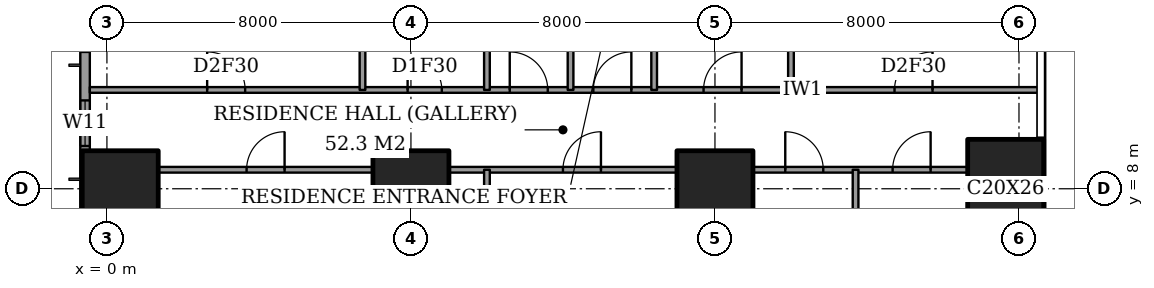
"""IFC4 building model, lengths in metres.
Left out: names, types, materials, properties, quantities, classifications, styles, units other than length and angle.
Written with IfcOpenShell. Run it as: python <this file> out.ifc"""

import sys

from ifc_helpers import new_model, si_unit, direction, frame, frame_2d, origin, origin_2d, place, context, subcontext, project, spatial, rectangle, extrude, element, fill, save


model = new_model("IFC4")
c1 = context("Model", 3, precision=1e-05, world=origin(), true_north=direction((0.0, 1.0)))
c2 = subcontext(c1, "Body", "Model", "MODEL_VIEW")
j1 = project(units=[si_unit("LENGTHUNIT", "METRE"), si_unit("PLANEANGLEUNIT", "RADIAN")], contexts=[c1])
p1 = place(None, origin())
s1 = spatial("IfcSite", under=j1, at=p1, CompositionType="ELEMENT")
p2 = place(p1, origin())
s2 = spatial("IfcBuilding", under=s1, at=p2, CompositionType="ELEMENT")
p3 = place(p2, frame((0.0, 0.0, 125.0)))
s3 = spatial("IfcBuildingStorey", under=s2, at=p3, CompositionType="ELEMENT", Elevation=125.0)
for number, where, z_axis, x_axis in (
    (1, (0.35, 8.0, 0.0), (0.0, 0.0, 1.0), (1.0, 0.0, 0.0)),
    (2, (8.0, 8.0, 0.0), (0.0, 0.0, 1.0), (1.0, 0.0, 0.0)),
    (3, (16.0, 8.0, 0.0), (0.0, 0.0, 1.0), (1.0, 0.0, 0.0)),
):
    element("IfcColumn", number, at=place(p3, frame(where, z_axis=z_axis, x_axis=x_axis)), inside=s3, PredefinedType="COLUMN", context=c2, shape_type="SweptSolid", body=[
        extrude(rectangle(XDim=2.0, YDim=2.0, at=origin_2d()), origin(), (0.0, 0.0, 1.0), 3.6),
    ])
p4 = place(p3, frame((23.65, 8.0, 0.0), z_axis=(0.0, 0.0, 1.0), x_axis=(1.0, 0.0, 0.0)))
e4 = element("IfcColumn", 4, at=p4, inside=s3, PredefinedType="COLUMN", context=c2, shape_type="SweptSolid", body=[
    extrude(rectangle(XDim=2.0, YDim=2.6, at=origin_2d()), origin(), (0.0, 0.0, 1.0), 3.6),
])
p5 = place(p3, frame((-0.575, 44.825, 0.0), z_axis=(0.0, 0.0, 1.0), x_axis=(0.0, -1.0, 0.0)))
e5 = element("IfcWall", 5, at=p5, inside=s3, PredefinedType="SOLIDWALL", context=c2, shape_type="SweptSolid", body=[
    extrude(rectangle(XDim=41.65, YDim=0.25, at=frame_2d((20.825, 0.0))), origin(), (0.0, 0.0, 1.0), 3.6),
])
p6 = place(p5, frame((0.775, 0.0, 0.4)))
e6 = element("IfcOpeningElement", 6, at=p6, cuts=e5, PredefinedType="OPENING", context=c2, shape_type="SweptSolid", body=[
    extrude(rectangle(XDim=2.4, YDim=2.2, at=frame_2d((1.2, 1.1))), frame((0.0, 0.135, 0.0), z_axis=(0.0, -1.0, 0.0), x_axis=(1.0, 0.0, 0.0)), (0.0, 0.0, 1.0), 0.27),
])
p7 = place(p5, frame((6.2, 0.0, 0.4)))
e7 = element("IfcOpeningElement", 7, at=p7, cuts=e5, PredefinedType="OPENING", context=c2, shape_type="SweptSolid", body=[
    extrude(rectangle(XDim=1.2, YDim=2.2, at=frame_2d((0.6, 1.1))), frame((0.0, 0.135, 0.0), z_axis=(0.0, -1.0, 0.0), x_axis=(1.0, 0.0, 0.0)), (0.0, 0.0, 1.0), 0.27),
])
p8 = place(p5, frame((8.525, 0.0, 0.4)))
e8 = element("IfcOpeningElement", 8, at=p8, cuts=e5, PredefinedType="OPENING", context=c2, shape_type="SweptSolid", body=[
    extrude(rectangle(XDim=2.4, YDim=2.2, at=frame_2d((1.2, 1.1))), frame((0.0, 0.135, 0.0), z_axis=(0.0, -1.0, 0.0), x_axis=(1.0, 0.0, 0.0)), (0.0, 0.0, 1.0), 0.27),
])
p9 = place(p5, frame((15.625, 0.0, 0.4)))
e9 = element("IfcOpeningElement", 9, at=p9, cuts=e5, PredefinedType="OPENING", context=c2, shape_type="SweptSolid", body=[
    extrude(rectangle(XDim=2.4, YDim=2.2, at=frame_2d((1.2, 1.1))), frame((0.0, 0.135, 0.0), z_axis=(0.0, -1.0, 0.0), x_axis=(1.0, 0.0, 0.0)), (0.0, 0.0, 1.0), 0.27),
])
p10 = place(p5, frame((23.625, 0.0, 0.4)))
e10 = element("IfcOpeningElement", 10, at=p10, cuts=e5, PredefinedType="OPENING", context=c2, shape_type="SweptSolid", body=[
    extrude(rectangle(XDim=2.4, YDim=2.2, at=frame_2d((1.2, 1.1))), frame((0.0, 0.135, 0.0), z_axis=(0.0, -1.0, 0.0), x_axis=(1.0, 0.0, 0.0)), (0.0, 0.0, 1.0), 0.27),
])
p11 = place(p5, frame((30.825, 0.0, 0.4)))
e11 = element("IfcOpeningElement", 11, at=p11, cuts=e5, PredefinedType="OPENING", context=c2, shape_type="SweptSolid", body=[
    extrude(rectangle(XDim=2.4, YDim=2.2, at=frame_2d((1.2, 1.1))), frame((0.0, 0.135, 0.0), z_axis=(0.0, -1.0, 0.0), x_axis=(1.0, 0.0, 0.0)), (0.0, 0.0, 1.0), 0.27),
])
p12 = place(p5, frame((34.5, 0.0, 0.4)))
e12 = element("IfcOpeningElement", 12, at=p12, cuts=e5, PredefinedType="OPENING", context=c2, shape_type="SweptSolid", body=[
    extrude(rectangle(XDim=1.2, YDim=2.2, at=frame_2d((0.6, 1.1))), frame((0.0, 0.135, 0.0), z_axis=(0.0, -1.0, 0.0), x_axis=(1.0, 0.0, 0.0)), (0.0, 0.0, 1.0), 0.27),
])
p13 = place(p5, frame((38.475, 0.0, 0.4)))
e13 = element("IfcOpeningElement", 13, at=p13, cuts=e5, PredefinedType="OPENING", context=c2, shape_type="SweptSolid", body=[
    extrude(rectangle(XDim=2.4, YDim=2.2, at=frame_2d((1.2, 1.1))), frame((0.0, 0.135, 0.0), z_axis=(0.0, -1.0, 0.0), x_axis=(1.0, 0.0, 0.0)), (0.0, 0.0, 1.0), 0.27),
])
p14 = place(p3, frame((1.35, 8.5, 0.0), z_axis=(0.0, 0.0, 1.0), x_axis=(1.0, 0.0, 0.0)))
e14 = element("IfcWall", 14, at=p14, inside=s3, PredefinedType="PARTITIONING", context=c2, shape_type="SweptSolid", body=[
    extrude(rectangle(XDim=5.65, YDim=0.15, at=frame_2d((2.825, 0.0))), origin(), (0.0, 0.0, 1.0), 3.35),
])
p15 = place(p14, frame((2.325, 0.0, 0.0)))
e15 = element("IfcOpeningElement", 15, at=p15, cuts=e14, PredefinedType="OPENING", context=c2, shape_type="SweptSolid", body=[
    extrude(rectangle(XDim=1.0, YDim=2.1, at=frame_2d((0.5, 1.05))), frame((0.0, 0.085, 0.0), z_axis=(0.0, -1.0, 0.0), x_axis=(1.0, 0.0, 0.0)), (0.0, 0.0, 1.0), 0.17),
])
p16 = place(p3, frame((9.0, 8.5, 0.0), z_axis=(0.0, 0.0, 1.0), x_axis=(1.0, 0.0, 0.0)))
e16 = element("IfcWall", 16, at=p16, inside=s3, PredefinedType="PARTITIONING", context=c2, shape_type="SweptSolid", body=[
    extrude(rectangle(XDim=6.0, YDim=0.15, at=frame_2d((3.0, 0.0))), origin(), (0.0, 0.0, 1.0), 3.35),
])
p17 = place(p16, frame((3.0, 0.0, 0.0)))
e17 = element("IfcOpeningElement", 17, at=p17, cuts=e16, PredefinedType="OPENING", context=c2, shape_type="SweptSolid", body=[
    extrude(rectangle(XDim=1.0, YDim=2.1, at=frame_2d((0.5, 1.05))), frame((0.0, 0.085, 0.0), z_axis=(0.0, -1.0, 0.0), x_axis=(1.0, 0.0, 0.0)), (0.0, 0.0, 1.0), 0.17),
])
p18 = place(p3, frame((17.0, 8.5, 0.0), z_axis=(0.0, 0.0, 1.0), x_axis=(1.0, 0.0, 0.0)))
e18 = element("IfcWall", 18, at=p18, inside=s3, PredefinedType="PARTITIONING", context=c2, shape_type="SweptSolid", body=[
    extrude(rectangle(XDim=5.65, YDim=0.15, at=frame_2d((2.825, 0.0))), origin(), (0.0, 0.0, 1.0), 3.35),
])
p19 = place(p18, frame((0.85, 0.0, 0.0)))
e19 = element("IfcOpeningElement", 19, at=p19, cuts=e18, PredefinedType="OPENING", context=c2, shape_type="SweptSolid", body=[
    extrude(rectangle(XDim=1.0, YDim=2.1, at=frame_2d((0.5, 1.05))), frame((0.0, 0.085, 0.0), z_axis=(0.0, -1.0, 0.0), x_axis=(1.0, 0.0, 0.0)), (0.0, 0.0, 1.0), 0.17),
])
p20 = place(p18, frame((3.675, 0.0, 0.0)))
e20 = element("IfcOpeningElement", 20, at=p20, cuts=e18, PredefinedType="OPENING", context=c2, shape_type="SweptSolid", body=[
    extrude(rectangle(XDim=1.0, YDim=2.1, at=frame_2d((0.5, 1.05))), frame((0.0, 0.085, 0.0), z_axis=(0.0, -1.0, 0.0), x_axis=(1.0, 0.0, 0.0)), (0.0, 0.0, 1.0), 0.17),
])
p21 = place(p3, frame((-0.45, 10.6, 0.0), z_axis=(0.0, 0.0, 1.0), x_axis=(1.0, 0.0, 0.0)))
e21 = element("IfcWall", 21, at=p21, inside=s3, PredefinedType="PARTITIONING", context=c2, shape_type="SweptSolid", body=[
    extrude(rectangle(XDim=25.011, YDim=0.15, at=frame_2d((12.505, 0.0))), origin(), (0.0, 0.0, 1.0), 3.35),
])
p22 = place(p21, frame((13.25, 0.0, 0.0)))
e22 = element("IfcOpeningElement", 22, at=p22, cuts=e21, PredefinedType="OPENING", context=c2, shape_type="SweptSolid", body=[
    extrude(rectangle(XDim=1.0, YDim=2.1, at=frame_2d((0.5, 1.05))), frame((0.0, 0.085, 0.0), z_axis=(0.0, -1.0, 0.0), x_axis=(1.0, 0.0, 0.0)), (0.0, 0.0, 1.0), 0.17),
])
p23 = place(p21, frame((3.087, 0.0, 0.0)))
e23 = element("IfcOpeningElement", 23, at=p23, cuts=e21, PredefinedType="OPENING", context=c2, shape_type="SweptSolid", body=[
    extrude(rectangle(XDim=1.0, YDim=2.1, at=frame_2d((0.5, 1.05))), frame((0.0, 0.085, 0.0), z_axis=(0.0, -1.0, 0.0), x_axis=(1.0, 0.0, 0.0)), (0.0, 0.0, 1.0), 0.17),
])
p24 = place(p21, frame((8.363, 0.0, 0.0)))
e24 = element("IfcOpeningElement", 24, at=p24, cuts=e21, PredefinedType="OPENING", context=c2, shape_type="SweptSolid", body=[
    extrude(rectangle(XDim=0.9, YDim=2.1, at=frame_2d((0.45, 1.05))), frame((0.0, 0.085, 0.0), z_axis=(0.0, -1.0, 0.0), x_axis=(1.0, 0.0, 0.0)), (0.0, 0.0, 1.0), 0.17),
])
p25 = place(p21, frame((11.05, 0.0, 0.0)))
e25 = element("IfcOpeningElement", 25, at=p25, cuts=e21, PredefinedType="OPENING", context=c2, shape_type="SweptSolid", body=[
    extrude(rectangle(XDim=1.0, YDim=2.1, at=frame_2d((0.5, 1.05))), frame((0.0, 0.085, 0.0), z_axis=(0.0, -1.0, 0.0), x_axis=(1.0, 0.0, 0.0)), (0.0, 0.0, 1.0), 0.17),
])
p26 = place(p21, frame((16.15, 0.0, 0.0)))
e26 = element("IfcOpeningElement", 26, at=p26, cuts=e21, PredefinedType="OPENING", context=c2, shape_type="SweptSolid", body=[
    extrude(rectangle(XDim=1.0, YDim=2.1, at=frame_2d((0.5, 1.05))), frame((0.0, 0.085, 0.0), z_axis=(0.0, -1.0, 0.0), x_axis=(1.0, 0.0, 0.0)), (0.0, 0.0, 1.0), 0.17),
])
p27 = place(p21, frame((21.175, 0.0, 0.0)))
e27 = element("IfcOpeningElement", 27, at=p27, cuts=e21, PredefinedType="OPENING", context=c2, shape_type="SweptSolid", body=[
    extrude(rectangle(XDim=1.0, YDim=2.1, at=frame_2d((0.5, 1.05))), frame((0.0, 0.085, 0.0), z_axis=(0.0, -1.0, 0.0), x_axis=(1.0, 0.0, 0.0)), (0.0, 0.0, 1.0), 0.17),
])
p28 = place(p3, frame((6.725, 10.6, 0.0), z_axis=(0.0, 0.0, 1.0), x_axis=(0.0, 1.0, 0.0)))
e28 = element("IfcWall", 28, at=p28, inside=s3, PredefinedType="PARTITIONING", context=c2, shape_type="SweptSolid", body=[
    extrude(rectangle(XDim=4.2, YDim=0.15, at=frame_2d((2.1, 0.0))), origin(), (0.0, 0.0, 1.0), 3.35),
])
p29 = place(p3, frame((10.0, -0.45, 0.0), z_axis=(0.0, 0.0, 1.0), x_axis=(0.0, 1.0, 0.0)))
e29 = element("IfcWall", 29, at=p29, inside=s3, PredefinedType="PARTITIONING", context=c2, shape_type="SweptSolid", body=[
    extrude(rectangle(XDim=8.95, YDim=0.15, at=frame_2d((4.475, 0.0))), origin(), (0.0, 0.0, 1.0), 3.35),
])
p30 = place(p3, frame((10.0, 10.6, 0.0), z_axis=(0.0, 0.0, 1.0), x_axis=(0.0, 1.0, 0.0)))
e30 = element("IfcWall", 30, at=p30, inside=s3, PredefinedType="PARTITIONING", context=c2, shape_type="SweptSolid", body=[
    extrude(rectangle(XDim=11.0, YDim=0.15, at=frame_2d((5.5, 0.0))), origin(), (0.0, 0.0, 1.0), 3.35),
])
p31 = place(p30, frame((8.2, 0.0, 0.0)))
e31 = element("IfcOpeningElement", 31, at=p31, cuts=e30, PredefinedType="OPENING", context=c2, shape_type="SweptSolid", body=[
    extrude(rectangle(XDim=1.0, YDim=2.1, at=frame_2d((0.5, 1.05))), frame((0.0, 0.085, 0.0), z_axis=(0.0, -1.0, 0.0), x_axis=(1.0, 0.0, 0.0)), (0.0, 0.0, 1.0), 0.17),
])
for number, where, z_axis, x_axis in (
    (32, (12.2, 10.6, 0.0), (0.0, 0.0, 1.0), (0.0, 1.0, 0.0)),
    (33, (14.4, 10.6, 0.0), (0.0, 0.0, 1.0), (0.0, 1.0, 0.0)),
    (34, (18.0, 10.6, 0.0), (0.0, 0.0, 1.0), (0.0, 1.0, 0.0)),
):
    element("IfcWall", number, at=place(p3, frame(where, z_axis=z_axis, x_axis=x_axis)), inside=s3, PredefinedType="PARTITIONING", context=c2, shape_type="SweptSolid", body=[
        extrude(rectangle(XDim=6.4, YDim=0.15, at=frame_2d((3.2, 0.0))), origin(), (0.0, 0.0, 1.0), 3.35),
    ])
p32 = place(p3, frame((19.7, -0.45, 0.0), z_axis=(0.0, 0.0, 1.0), x_axis=(0.0, 1.0, 0.0)))
e35 = element("IfcWall", 35, at=p32, inside=s3, PredefinedType="PARTITIONING", context=c2, shape_type="SweptSolid", body=[
    extrude(rectangle(XDim=8.95, YDim=0.15, at=frame_2d((4.475, 0.0))), origin(), (0.0, 0.0, 1.0), 3.35),
])
p33 = place(p12, origin())
e36 = element("IfcWindow", 36, at=p33, inside=s3, PartitioningType="SINGLE_PANEL", PredefinedType="WINDOW", context=c2, shape_type="SweptSolid", body=[
    extrude(rectangle(XDim=1.2, YDim=2.2, at=frame_2d((0.6, 1.1))), frame((0.0, 0.03, 0.0), z_axis=(0.0, -1.0, 0.0), x_axis=(1.0, 0.0, 0.0)), (0.0, 0.0, 1.0), 0.06),
])
fill(e12, e36)
p34 = place(p15, origin())
e37 = element("IfcDoor", 37, at=p34, inside=s3, OperationType="SINGLE_SWING_LEFT", PredefinedType="DOOR", context=c2, shape_type="SweptSolid", body=[
    extrude(rectangle(XDim=1.0, YDim=2.1, at=frame_2d((0.5, 1.05))), frame((0.0, 0.025, 0.0), z_axis=(0.0, -1.0, 0.0), x_axis=(1.0, 0.0, 0.0)), (0.0, 0.0, 1.0), 0.05),
])
fill(e15, e37)
p35 = place(p17, origin())
e38 = element("IfcDoor", 38, at=p35, inside=s3, OperationType="SINGLE_SWING_LEFT", PredefinedType="DOOR", context=c2, shape_type="SweptSolid", body=[
    extrude(rectangle(XDim=1.0, YDim=2.1, at=frame_2d((0.5, 1.05))), frame((0.0, 0.025, 0.0), z_axis=(0.0, -1.0, 0.0), x_axis=(1.0, 0.0, 0.0)), (0.0, 0.0, 1.0), 0.05),
])
fill(e17, e38)
p36 = place(p19, origin())
e39 = element("IfcDoor", 39, at=p36, inside=s3, OperationType="SINGLE_SWING_RIGHT", PredefinedType="DOOR", context=c2, shape_type="SweptSolid", body=[
    extrude(rectangle(XDim=1.0, YDim=2.1, at=frame_2d((0.5, 1.05))), frame((0.0, 0.025, 0.0), z_axis=(0.0, -1.0, 0.0), x_axis=(1.0, 0.0, 0.0)), (0.0, 0.0, 1.0), 0.05),
])
fill(e19, e39)
p37 = place(p20, origin())
e40 = element("IfcDoor", 40, at=p37, inside=s3, OperationType="SINGLE_SWING_LEFT", PredefinedType="DOOR", context=c2, shape_type="SweptSolid", body=[
    extrude(rectangle(XDim=1.0, YDim=2.1, at=frame_2d((0.5, 1.05))), frame((0.0, 0.025, 0.0), z_axis=(0.0, -1.0, 0.0), x_axis=(1.0, 0.0, 0.0)), (0.0, 0.0, 1.0), 0.05),
])
fill(e20, e40)
p38 = place(p22, origin())
e41 = element("IfcDoor", 41, at=p38, inside=s3, OperationType="SINGLE_SWING_LEFT", PredefinedType="DOOR", context=c2, shape_type="SweptSolid", body=[
    extrude(rectangle(XDim=1.0, YDim=2.1, at=frame_2d((0.5, 1.05))), frame((0.0, 0.025, 0.0), z_axis=(0.0, -1.0, 0.0), x_axis=(1.0, 0.0, 0.0)), (0.0, 0.0, 1.0), 0.05),
])
fill(e22, e41)
p39 = place(p23, origin())
e42 = element("IfcDoor", 42, at=p39, inside=s3, OperationType="SINGLE_SWING_RIGHT", PredefinedType="DOOR", context=c2, shape_type="SweptSolid", body=[
    extrude(rectangle(XDim=1.0, YDim=2.1, at=frame_2d((0.5, 1.05))), frame((0.0, 0.025, 0.0), z_axis=(0.0, -1.0, 0.0), x_axis=(1.0, 0.0, 0.0)), (0.0, 0.0, 1.0), 0.05),
])
fill(e23, e42)
p40 = place(p24, origin())
e43 = element("IfcDoor", 43, at=p40, inside=s3, OperationType="SINGLE_SWING_RIGHT", PredefinedType="DOOR", context=c2, shape_type="SweptSolid", body=[
    extrude(rectangle(XDim=0.9, YDim=2.1, at=frame_2d((0.45, 1.05))), frame((0.0, 0.025, 0.0), z_axis=(0.0, -1.0, 0.0), x_axis=(1.0, 0.0, 0.0)), (0.0, 0.0, 1.0), 0.05),
])
fill(e24, e43)
p41 = place(p25, origin())
e44 = element("IfcDoor", 44, at=p41, inside=s3, OperationType="SINGLE_SWING_RIGHT", PredefinedType="DOOR", context=c2, shape_type="SweptSolid", body=[
    extrude(rectangle(XDim=1.0, YDim=2.1, at=frame_2d((0.5, 1.05))), frame((0.0, 0.025, 0.0), z_axis=(0.0, -1.0, 0.0), x_axis=(1.0, 0.0, 0.0)), (0.0, 0.0, 1.0), 0.05),
])
fill(e25, e44)
p42 = place(p26, origin())
e45 = element("IfcDoor", 45, at=p42, inside=s3, OperationType="SINGLE_SWING_LEFT", PredefinedType="DOOR", context=c2, shape_type="SweptSolid", body=[
    extrude(rectangle(XDim=1.0, YDim=2.1, at=frame_2d((0.5, 1.05))), frame((0.0, 0.025, 0.0), z_axis=(0.0, -1.0, 0.0), x_axis=(1.0, 0.0, 0.0)), (0.0, 0.0, 1.0), 0.05),
])
fill(e26, e45)
p43 = place(p27, origin())
e46 = element("IfcDoor", 46, at=p43, inside=s3, OperationType="SINGLE_SWING_LEFT", PredefinedType="DOOR", context=c2, shape_type="SweptSolid", body=[
    extrude(rectangle(XDim=1.0, YDim=2.1, at=frame_2d((0.5, 1.05))), frame((0.0, 0.025, 0.0), z_axis=(0.0, -1.0, 0.0), x_axis=(1.0, 0.0, 0.0)), (0.0, 0.0, 1.0), 0.05),
])
fill(e27, e46)
save(model, sys.argv[1])
